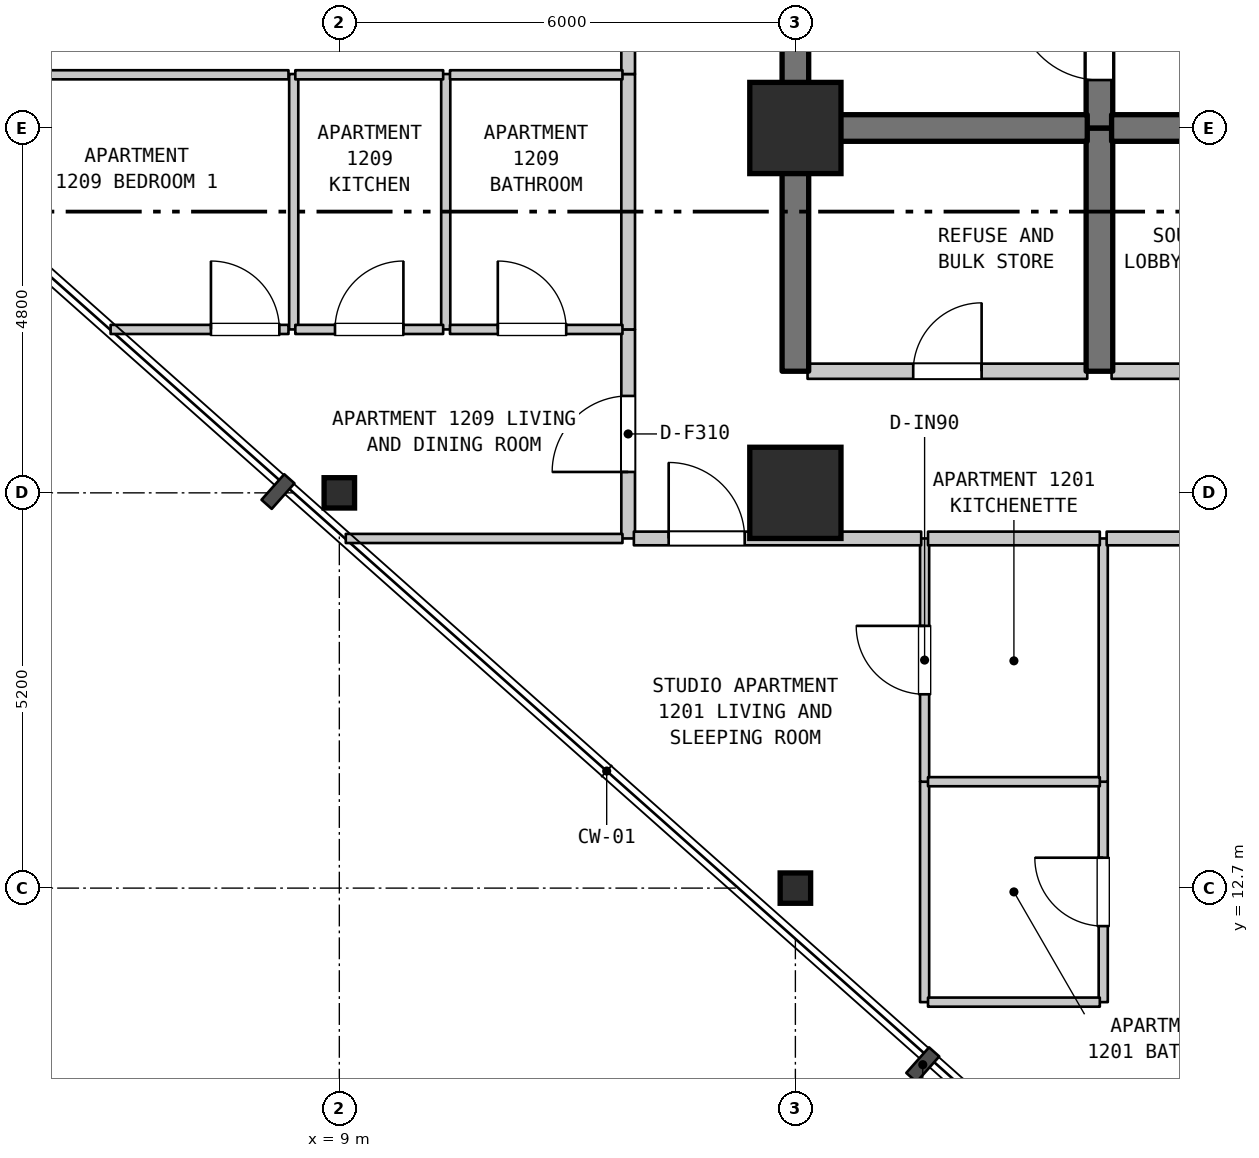
"""IFC4 building model, lengths in metres.
Left out: names, types, materials, properties, quantities, classifications, styles, units other than length and angle.
Written with IfcOpenShell. Run it as: python <this file> out.ifc"""

import sys

from ifc_helpers import new_model, si_unit, direction, frame, frame_2d, origin, origin_2d, place, context, subcontext, project, spatial, rectangle, i_section, extrude, element, fill, save


model = new_model("IFC4")
c1 = context("Model", 3, precision=1e-05, world=origin(), true_north=direction((0.0, 1.0)))
c2 = subcontext(c1, "Body", "Model", "MODEL_VIEW")
j1 = project(units=[si_unit("LENGTHUNIT", "METRE"), si_unit("PLANEANGLEUNIT", "RADIAN")], contexts=[c1])
p1 = place(None, origin())
s1 = spatial("IfcSite", under=j1, at=p1, CompositionType="ELEMENT")
p2 = place(p1, origin())
s2 = spatial("IfcBuilding", under=s1, at=p2, CompositionType="ELEMENT")
p3 = place(p2, frame((0.0, 0.0, 53.6)))
s3 = spatial("IfcBuildingStorey", under=s2, at=p3, CompositionType="ELEMENT", Elevation=53.6)
for number, where, z_axis, x_axis in (
    (1, (9.0, 17.9, 0.0), (0.0, 0.0, 1.0), (1.0, 0.0, 0.0)),
    (2, (15.0, 12.7, 0.0), (0.0, 0.0, 1.0), (1.0, 0.0, 0.0)),
):
    element("IfcColumn", number, at=place(p3, frame(where, z_axis=z_axis, x_axis=x_axis)), inside=s3, PredefinedType="COLUMN", context=c2, shape_type="SweptSolid", body=[
        extrude(i_section(OverallWidth=0.401, OverallDepth=0.399, WebThickness=0.025, FlangeThickness=0.04, FilletRadius=0.015, at=origin_2d()), origin(), (0.0, 0.0, 1.0), 3.7),
    ])
for number, where, z_axis, x_axis in (
    (3, (15.0, 17.9, 0.0), (0.0, 0.0, 1.0), (1.0, 0.0, 0.0)),
    (4, (15.0, 22.7, 0.0), (0.0, 0.0, 1.0), (1.0, 0.0, 0.0)),
):
    element("IfcColumn", number, at=place(p3, frame(where, z_axis=z_axis, x_axis=x_axis)), inside=s3, PredefinedType="COLUMN", context=c2, shape_type="SweptSolid", body=[
        extrude(rectangle(XDim=1.2, YDim=1.2, at=origin_2d()), origin(), (0.0, 0.0, 1.0), 3.7),
    ])
for number, where, z_axis, x_axis in (
    (5, (8.4, 20.05, 0.0), (0.0, 0.0, 1.0), (0.0, 1.0, 0.0)),
    (6, (10.4, 20.05, 0.0), (0.0, 0.0, 1.0), (0.0, 1.0, 0.0)),
):
    element("IfcWall", number, at=place(p3, frame(where, z_axis=z_axis, x_axis=x_axis)), inside=s3, PredefinedType="PARTITIONING", context=c2, shape_type="SweptSolid", body=[
        extrude(rectangle(XDim=3.36, YDim=0.12, at=frame_2d((1.68, 0.0))), origin(), (0.0, 0.0, 1.0), 3.385),
    ])
p4 = place(p3, frame((12.8, 17.3, 0.0), z_axis=(0.0, 0.0, 1.0), x_axis=(0.0, 1.0, 0.0)))
e7 = element("IfcWall", 7, at=p4, inside=s3, PredefinedType="STANDARD", context=c2, shape_type="SweptSolid", body=[
    extrude(rectangle(XDim=2.75, YDim=0.18, at=frame_2d((1.375, 0.0))), origin(), (0.0, 0.0, 1.0), 3.385),
])
p5 = place(p4, frame((0.875, 0.0, 0.0)))
e8 = element("IfcOpeningElement", 8, at=p5, cuts=e7, PredefinedType="OPENING", context=c2, shape_type="SweptSolid", body=[
    extrude(rectangle(XDim=1.0, YDim=2.15, at=frame_2d((0.5, 1.075))), frame((0.0, 0.1, 0.0), z_axis=(0.0, -1.0, 0.0), x_axis=(1.0, 0.0, 0.0)), (0.0, 0.0, 1.0), 0.2),
])
p6 = place(p3, frame((12.8, 20.05, 0.0), z_axis=(0.0, 0.0, 1.0), x_axis=(0.0, 1.0, 0.0)))
e9 = element("IfcWall", 9, at=p6, inside=s3, PredefinedType="STANDARD", context=c2, shape_type="SweptSolid", body=[
    extrude(rectangle(XDim=3.36, YDim=0.18, at=frame_2d((1.68, 0.0))), origin(), (0.0, 0.0, 1.0), 3.385),
])
p7 = place(p3, frame((12.8, 23.41, 0.0), z_axis=(0.0, 0.0, 1.0), x_axis=(0.0, 1.0, 0.0)))
e10 = element("IfcWall", 10, at=p7, inside=s3, PredefinedType="STANDARD", context=c2, shape_type="SweptSolid", body=[
    extrude(rectangle(XDim=2.75, YDim=0.18, at=frame_2d((1.375, 0.0))), origin(), (0.0, 0.0, 1.0), 3.385),
])
p8 = place(p7, frame((0.875, 0.0, 0.0)))
e11 = element("IfcOpeningElement", 11, at=p8, cuts=e10, PredefinedType="OPENING", context=c2, shape_type="SweptSolid", body=[
    extrude(rectangle(XDim=1.0, YDim=2.15, at=frame_2d((0.5, 1.075))), frame((0.0, 0.1, 0.0), z_axis=(0.0, -1.0, 0.0), x_axis=(1.0, 0.0, 0.0)), (0.0, 0.0, 1.0), 0.2),
])
p9 = place(p3, frame((15.0, 19.5, 0.0), z_axis=(0.0, 0.0, 1.0), x_axis=(0.0, 1.0, 0.0)))
e12 = element("IfcWall", 12, at=p9, inside=s3, PredefinedType="SHEAR", context=c2, shape_type="SweptSolid", body=[
    extrude(rectangle(XDim=3.2, YDim=0.35, at=frame_2d((1.6, 0.0))), origin(), (0.0, 0.0, 1.0), 3.385),
])
p10 = place(p3, frame((15.0, 22.7, 0.0), z_axis=(0.0, 0.0, 1.0), x_axis=(0.0, 1.0, 0.0)))
e13 = element("IfcWall", 13, at=p10, inside=s3, PredefinedType="SHEAR", context=c2, shape_type="SweptSolid", body=[
    extrude(rectangle(XDim=6.8, YDim=0.35, at=frame_2d((3.4, 0.0))), origin(), (0.0, 0.0, 1.0), 3.385),
])
p11 = place(p3, frame((16.7, 11.2, 0.0), z_axis=(0.0, 0.0, 1.0), x_axis=(0.0, 1.0, 0.0)))
e14 = element("IfcWall", 14, at=p11, inside=s3, PredefinedType="PARTITIONING", context=c2, shape_type="SweptSolid", body=[
    extrude(rectangle(XDim=2.9, YDim=0.12, at=frame_2d((1.45, 0.0))), origin(), (0.0, 0.0, 1.0), 3.385),
])
p12 = place(p3, frame((16.7, 14.1, 0.0), z_axis=(0.0, 0.0, 1.0), x_axis=(0.0, 1.0, 0.0)))
e15 = element("IfcWall", 15, at=p12, inside=s3, PredefinedType="PARTITIONING", context=c2, shape_type="SweptSolid", body=[
    extrude(rectangle(XDim=3.2, YDim=0.12, at=frame_2d((1.6, 0.0))), origin(), (0.0, 0.0, 1.0), 3.385),
])
p13 = place(p12, frame((1.15, 0.0, 0.0)))
e16 = element("IfcOpeningElement", 16, at=p13, cuts=e15, PredefinedType="OPENING", context=c2, shape_type="SweptSolid", body=[
    extrude(rectangle(XDim=0.9, YDim=2.15, at=frame_2d((0.45, 1.075))), frame((0.0, 0.07, 0.0), z_axis=(0.0, -1.0, 0.0), x_axis=(1.0, 0.0, 0.0)), (0.0, 0.0, 1.0), 0.14),
])
p14 = place(p3, frame((19.0, 19.5, 0.0), z_axis=(0.0, 0.0, 1.0), x_axis=(0.0, 1.0, 0.0)))
e17 = element("IfcWall", 17, at=p14, inside=s3, PredefinedType="SHEAR", context=c2, shape_type="SweptSolid", body=[
    extrude(rectangle(XDim=3.2, YDim=0.35, at=frame_2d((1.6, 0.0))), origin(), (0.0, 0.0, 1.0), 3.385),
])
p15 = place(p3, frame((19.0, 22.7, 0.0), z_axis=(0.0, 0.0, 1.0), x_axis=(0.0, 1.0, 0.0)))
e18 = element("IfcWall", 18, at=p15, inside=s3, PredefinedType="SHEAR", context=c2, shape_type="SweptSolid", body=[
    extrude(rectangle(XDim=5.5, YDim=0.35, at=frame_2d((2.75, 0.0))), origin(), (0.0, 0.0, 1.0), 3.385),
])
p16 = place(p15, frame((0.631, 0.0, 0.0)))
e19 = element("IfcOpeningElement", 19, at=p16, cuts=e18, PredefinedType="OPENING", context=c2, shape_type="SweptSolid", body=[
    extrude(rectangle(XDim=1.1, YDim=2.15, at=frame_2d((0.55, 1.075))), frame((0.0, 0.185, 0.0), z_axis=(0.0, -1.0, 0.0), x_axis=(1.0, 0.0, 0.0)), (0.0, 0.0, 1.0), 0.37),
])
p17 = place(p3, frame((19.05, 11.2, 0.0), z_axis=(0.0, 0.0, 1.0), x_axis=(0.0, 1.0, 0.0)))
e20 = element("IfcWall", 20, at=p17, inside=s3, PredefinedType="PARTITIONING", context=c2, shape_type="SweptSolid", body=[
    extrude(rectangle(XDim=2.9, YDim=0.12, at=frame_2d((1.45, 0.0))), origin(), (0.0, 0.0, 1.0), 3.385),
])
p18 = place(p17, frame((1.0, 0.0, 0.0)))
e21 = element("IfcOpeningElement", 21, at=p18, cuts=e20, PredefinedType="OPENING", context=c2, shape_type="SweptSolid", body=[
    extrude(rectangle(XDim=0.9, YDim=2.1, at=frame_2d((0.45, 1.05))), frame((0.0, 0.07, 0.0), z_axis=(0.0, -1.0, 0.0), x_axis=(1.0, 0.0, 0.0)), (0.0, 0.0, 1.0), 0.14),
])
p19 = place(p3, frame((19.05, 14.1, 0.0), z_axis=(0.0, 0.0, 1.0), x_axis=(0.0, 1.0, 0.0)))
e22 = element("IfcWall", 22, at=p19, inside=s3, PredefinedType="PARTITIONING", context=c2, shape_type="SweptSolid", body=[
    extrude(rectangle(XDim=3.2, YDim=0.12, at=frame_2d((1.6, 0.0))), origin(), (0.0, 0.0, 1.0), 3.385),
])
for number, where, z_axis, x_axis in (
    (23, (16.745, 11.2, 0.0), (0.0, 0.0, 1.0), (1.0, 0.0, 0.0)),
    (24, (16.745, 14.1, 0.0), (0.0, 0.0, 1.0), (1.0, 0.0, 0.0)),
):
    element("IfcWall", number, at=place(p3, frame(where, z_axis=z_axis, x_axis=x_axis)), inside=s3, PredefinedType="PARTITIONING", context=c2, shape_type="SweptSolid", body=[
        extrude(rectangle(XDim=2.26, YDim=0.12, at=frame_2d((1.13, 0.0))), origin(), (0.0, 0.0, 1.0), 3.385),
    ])
p20 = place(p3, frame((9.085, 17.3, 0.0), z_axis=(0.0, 0.0, 1.0), x_axis=(1.0, 0.0, 0.0)))
e25 = element("IfcWall", 25, at=p20, inside=s3, PredefinedType="PARTITIONING", context=c2, shape_type="SweptSolid", body=[
    extrude(rectangle(XDim=3.64, YDim=0.12, at=frame_2d((1.82, 0.0))), origin(), (0.0, 0.0, 1.0), 3.385),
])
p21 = place(p3, frame((12.875, 17.3, 0.0), z_axis=(0.0, 0.0, 1.0), x_axis=(1.0, 0.0, 0.0)))
e26 = element("IfcWall", 26, at=p21, inside=s3, PredefinedType="STANDARD", context=c2, shape_type="SweptSolid", body=[
    extrude(rectangle(XDim=3.78, YDim=0.18, at=frame_2d((1.89, 0.0))), origin(), (0.0, 0.0, 1.0), 3.385),
])
p22 = place(p21, frame((0.458, 0.0, 0.0)))
e27 = element("IfcOpeningElement", 27, at=p22, cuts=e26, PredefinedType="OPENING", context=c2, shape_type="SweptSolid", body=[
    extrude(rectangle(XDim=1.0, YDim=2.15, at=frame_2d((0.5, 1.075))), frame((0.0, 0.1, 0.0), z_axis=(0.0, -1.0, 0.0), x_axis=(1.0, 0.0, 0.0)), (0.0, 0.0, 1.0), 0.2),
])
p23 = place(p3, frame((16.745, 17.3, 0.0), z_axis=(0.0, 0.0, 1.0), x_axis=(1.0, 0.0, 0.0)))
e28 = element("IfcWall", 28, at=p23, inside=s3, PredefinedType="STANDARD", context=c2, shape_type="SweptSolid", body=[
    extrude(rectangle(XDim=2.26, YDim=0.18, at=frame_2d((1.13, 0.0))), origin(), (0.0, 0.0, 1.0), 3.385),
])
p24 = place(p3, frame((19.095, 17.3, 0.0), z_axis=(0.0, 0.0, 1.0), x_axis=(1.0, 0.0, 0.0)))
e29 = element("IfcWall", 29, at=p24, inside=s3, PredefinedType="STANDARD", context=c2, shape_type="SweptSolid", body=[
    extrude(rectangle(XDim=1.86, YDim=0.18, at=frame_2d((0.93, 0.0))), origin(), (0.0, 0.0, 1.0), 3.385),
])
p25 = place(p3, frame((15.16, 19.5, 0.0), z_axis=(0.0, 0.0, 1.0), x_axis=(1.0, 0.0, 0.0)))
e30 = element("IfcWall", 30, at=p25, inside=s3, PredefinedType="STANDARD", context=c2, shape_type="SweptSolid", body=[
    extrude(rectangle(XDim=3.68, YDim=0.2, at=frame_2d((1.84, 0.0))), origin(), (0.0, 0.0, 1.0), 3.385),
])
p26 = place(p25, frame((1.39, 0.0, 0.0)))
e31 = element("IfcOpeningElement", 31, at=p26, cuts=e30, PredefinedType="OPENING", context=c2, shape_type="SweptSolid", body=[
    extrude(rectangle(XDim=0.9, YDim=2.15, at=frame_2d((0.45, 1.075))), frame((0.0, 0.11, 0.0), z_axis=(0.0, -1.0, 0.0), x_axis=(1.0, 0.0, 0.0)), (0.0, 0.0, 1.0), 0.22),
])
p27 = place(p3, frame((19.16, 19.5, 0.0), z_axis=(0.0, 0.0, 1.0), x_axis=(1.0, 0.0, 0.0)))
e32 = element("IfcWall", 32, at=p27, inside=s3, PredefinedType="STANDARD", context=c2, shape_type="SweptSolid", body=[
    extrude(rectangle(XDim=4.48, YDim=0.2, at=frame_2d((2.24, 0.0))), origin(), (0.0, 0.0, 1.0), 3.385),
])
p28 = place(p27, frame((1.64, 0.0, 0.0)))
e33 = element("IfcOpeningElement", 33, at=p28, cuts=e32, PredefinedType="OPENING", context=c2, shape_type="SweptSolid", body=[
    extrude(rectangle(XDim=1.2, YDim=2.2, at=frame_2d((0.6, 1.1))), frame((0.0, 0.11, 0.0), z_axis=(0.0, -1.0, 0.0), x_axis=(1.0, 0.0, 0.0)), (0.0, 0.0, 1.0), 0.22),
])
p29 = place(p3, frame((5.991, 20.05, 0.0), z_axis=(0.0, 0.0, 1.0), x_axis=(1.0, 0.0, 0.0)))
e34 = element("IfcWall", 34, at=p29, inside=s3, PredefinedType="PARTITIONING", context=c2, shape_type="SweptSolid", body=[
    extrude(rectangle(XDim=2.34, YDim=0.12, at=frame_2d((1.17, 0.0))), origin(), (0.0, 0.0, 1.0), 3.385),
])
p30 = place(p29, frame((1.32, 0.0, 0.0)))
e35 = element("IfcOpeningElement", 35, at=p30, cuts=e34, PredefinedType="OPENING", context=c2, shape_type="SweptSolid", body=[
    extrude(rectangle(XDim=0.9, YDim=2.15, at=frame_2d((0.45, 1.075))), frame((0.0, 0.07, 0.0), z_axis=(0.0, -1.0, 0.0), x_axis=(1.0, 0.0, 0.0)), (0.0, 0.0, 1.0), 0.14),
])
p31 = place(p3, frame((8.421, 20.05, 0.0), z_axis=(0.0, 0.0, 1.0), x_axis=(1.0, 0.0, 0.0)))
e36 = element("IfcWall", 36, at=p31, inside=s3, PredefinedType="PARTITIONING", context=c2, shape_type="SweptSolid", body=[
    extrude(rectangle(XDim=1.945, YDim=0.12, at=frame_2d((0.973, 0.0))), origin(), (0.0, 0.0, 1.0), 3.385),
])
p32 = place(p31, frame((0.522, 0.0, 0.0)))
e37 = element("IfcOpeningElement", 37, at=p32, cuts=e36, PredefinedType="OPENING", context=c2, shape_type="SweptSolid", body=[
    extrude(rectangle(XDim=0.9, YDim=2.15, at=frame_2d((0.45, 1.075))), frame((0.0, 0.07, 0.0), z_axis=(0.0, -1.0, 0.0), x_axis=(1.0, 0.0, 0.0)), (0.0, 0.0, 1.0), 0.14),
])
p33 = place(p3, frame((10.456, 20.05, 0.0), z_axis=(0.0, 0.0, 1.0), x_axis=(1.0, 0.0, 0.0)))
e38 = element("IfcWall", 38, at=p33, inside=s3, PredefinedType="PARTITIONING", context=c2, shape_type="SweptSolid", body=[
    extrude(rectangle(XDim=2.269, YDim=0.12, at=frame_2d((1.135, 0.0))), origin(), (0.0, 0.0, 1.0), 3.385),
])
p34 = place(p33, frame((0.629, 0.0, 0.0)))
e39 = element("IfcOpeningElement", 39, at=p34, cuts=e38, PredefinedType="OPENING", context=c2, shape_type="SweptSolid", body=[
    extrude(rectangle(XDim=0.9, YDim=2.1, at=frame_2d((0.45, 1.05))), frame((0.0, 0.07, 0.0), z_axis=(0.0, -1.0, 0.0), x_axis=(1.0, 0.0, 0.0)), (0.0, 0.0, 1.0), 0.14),
])
p35 = place(p3, frame((15.16, 22.7, 0.0), z_axis=(0.0, 0.0, 1.0), x_axis=(1.0, 0.0, 0.0)))
e40 = element("IfcWall", 40, at=p35, inside=s3, PredefinedType="SHEAR", context=c2, shape_type="SweptSolid", body=[
    extrude(rectangle(XDim=3.68, YDim=0.35, at=frame_2d((1.84, 0.0))), origin(), (0.0, 0.0, 1.0), 3.385),
])
p36 = place(p3, frame((19.16, 22.7, 0.0), z_axis=(0.0, 0.0, 1.0), x_axis=(1.0, 0.0, 0.0)))
e41 = element("IfcWall", 41, at=p36, inside=s3, PredefinedType="SHEAR", context=c2, shape_type="SweptSolid", body=[
    extrude(rectangle(XDim=4.48, YDim=0.35, at=frame_2d((2.24, 0.0))), origin(), (0.0, 0.0, 1.0), 3.385),
])
p37 = place(p36, frame((1.64, 0.0, 0.0)))
e42 = element("IfcOpeningElement", 42, at=p37, cuts=e41, PredefinedType="OPENING", context=c2, shape_type="SweptSolid", body=[
    extrude(rectangle(XDim=1.2, YDim=2.2, at=frame_2d((0.6, 1.1))), frame((0.0, 0.185, 0.0), z_axis=(0.0, -1.0, 0.0), x_axis=(1.0, 0.0, 0.0)), (0.0, 0.0, 1.0), 0.37),
])
p38 = place(p3, frame((3.469, 23.4, 0.0), z_axis=(0.0, 0.0, 1.0), x_axis=(1.0, 0.0, 0.0)))
e43 = element("IfcWall", 43, at=p38, inside=s3, PredefinedType="PARTITIONING", context=c2, shape_type="SweptSolid", body=[
    extrude(rectangle(XDim=4.862, YDim=0.12, at=frame_2d((2.431, 0.0))), origin(), (0.0, 0.0, 1.0), 3.385),
])
p39 = place(p3, frame((8.421, 23.4, 0.0), z_axis=(0.0, 0.0, 1.0), x_axis=(1.0, 0.0, 0.0)))
e44 = element("IfcWall", 44, at=p39, inside=s3, PredefinedType="PARTITIONING", context=c2, shape_type="SweptSolid", body=[
    extrude(rectangle(XDim=1.945, YDim=0.12, at=frame_2d((0.973, 0.0))), origin(), (0.0, 0.0, 1.0), 3.385),
])
p40 = place(p3, frame((10.456, 23.4, 0.0), z_axis=(0.0, 0.0, 1.0), x_axis=(1.0, 0.0, 0.0)))
e45 = element("IfcWall", 45, at=p40, inside=s3, PredefinedType="PARTITIONING", context=c2, shape_type="SweptSolid", body=[
    extrude(rectangle(XDim=2.269, YDim=0.12, at=frame_2d((1.135, 0.0))), origin(), (0.0, 0.0, 1.0), 3.385),
])
p41 = place(p5, origin())
e46 = element("IfcDoor", 46, at=p41, inside=s3, OperationType="SINGLE_SWING_LEFT", PredefinedType="DOOR", context=c2, shape_type="SweptSolid", body=[
    extrude(rectangle(XDim=1.0, YDim=2.15, at=frame_2d((0.5, 1.075))), frame((0.0, 0.025, 0.0), z_axis=(0.0, -1.0, 0.0), x_axis=(1.0, 0.0, 0.0)), (0.0, 0.0, 1.0), 0.05),
])
fill(e8, e46)
p42 = place(p13, origin())
e47 = element("IfcDoor", 47, at=p42, inside=s3, OperationType="SINGLE_SWING_RIGHT", PredefinedType="DOOR", context=c2, shape_type="SweptSolid", body=[
    extrude(rectangle(XDim=0.9, YDim=2.15, at=frame_2d((0.45, 1.075))), frame((0.0, 0.025, 0.0), z_axis=(0.0, -1.0, 0.0), x_axis=(1.0, 0.0, 0.0)), (0.0, 0.0, 1.0), 0.05),
])
fill(e16, e47)
p43 = place(p16, origin())
e48 = element("IfcDoor", 48, at=p43, inside=s3, OperationType="SINGLE_SWING_RIGHT", PredefinedType="DOOR", context=c2, shape_type="SweptSolid", body=[
    extrude(rectangle(XDim=1.1, YDim=2.15, at=frame_2d((0.55, 1.075))), frame((0.0, 0.025, 0.0), z_axis=(0.0, -1.0, 0.0), x_axis=(1.0, 0.0, 0.0)), (0.0, 0.0, 1.0), 0.05),
])
fill(e19, e48)
p44 = place(p18, origin())
e49 = element("IfcDoor", 49, at=p44, inside=s3, OperationType="SINGLE_SWING_RIGHT", PredefinedType="DOOR", context=c2, shape_type="SweptSolid", body=[
    extrude(rectangle(XDim=0.9, YDim=2.1, at=frame_2d((0.45, 1.05))), frame((0.0, 0.025, 0.0), z_axis=(0.0, -1.0, 0.0), x_axis=(1.0, 0.0, 0.0)), (0.0, 0.0, 1.0), 0.05),
])
fill(e21, e49)
p45 = place(p22, origin())
e50 = element("IfcDoor", 50, at=p45, inside=s3, OperationType="SINGLE_SWING_LEFT", PredefinedType="DOOR", context=c2, shape_type="SweptSolid", body=[
    extrude(rectangle(XDim=1.0, YDim=2.15, at=frame_2d((0.5, 1.075))), frame((0.0, 0.025, 0.0), z_axis=(0.0, -1.0, 0.0), x_axis=(1.0, 0.0, 0.0)), (0.0, 0.0, 1.0), 0.05),
])
fill(e27, e50)
p46 = place(p26, origin())
e51 = element("IfcDoor", 51, at=p46, inside=s3, OperationType="SINGLE_SWING_RIGHT", PredefinedType="DOOR", context=c2, shape_type="SweptSolid", body=[
    extrude(rectangle(XDim=0.9, YDim=2.15, at=frame_2d((0.45, 1.075))), frame((0.0, 0.025, 0.0), z_axis=(0.0, -1.0, 0.0), x_axis=(1.0, 0.0, 0.0)), (0.0, 0.0, 1.0), 0.05),
])
fill(e31, e51)
p47 = place(p30, origin())
e52 = element("IfcDoor", 52, at=p47, inside=s3, OperationType="SINGLE_SWING_LEFT", PredefinedType="DOOR", context=c2, shape_type="SweptSolid", body=[
    extrude(rectangle(XDim=0.9, YDim=2.15, at=frame_2d((0.45, 1.075))), frame((0.0, 0.025, 0.0), z_axis=(0.0, -1.0, 0.0), x_axis=(1.0, 0.0, 0.0)), (0.0, 0.0, 1.0), 0.05),
])
fill(e35, e52)
p48 = place(p32, origin())
e53 = element("IfcDoor", 53, at=p48, inside=s3, OperationType="SINGLE_SWING_RIGHT", PredefinedType="DOOR", context=c2, shape_type="SweptSolid", body=[
    extrude(rectangle(XDim=0.9, YDim=2.15, at=frame_2d((0.45, 1.075))), frame((0.0, 0.025, 0.0), z_axis=(0.0, -1.0, 0.0), x_axis=(1.0, 0.0, 0.0)), (0.0, 0.0, 1.0), 0.05),
])
fill(e37, e53)
p49 = place(p34, origin())
e54 = element("IfcDoor", 54, at=p49, inside=s3, OperationType="SINGLE_SWING_LEFT", PredefinedType="DOOR", context=c2, shape_type="SweptSolid", body=[
    extrude(rectangle(XDim=0.9, YDim=2.1, at=frame_2d((0.45, 1.05))), frame((0.0, 0.025, 0.0), z_axis=(0.0, -1.0, 0.0), x_axis=(1.0, 0.0, 0.0)), (0.0, 0.0, 1.0), 0.05),
])
fill(e39, e54)
save(model, sys.argv[1])
